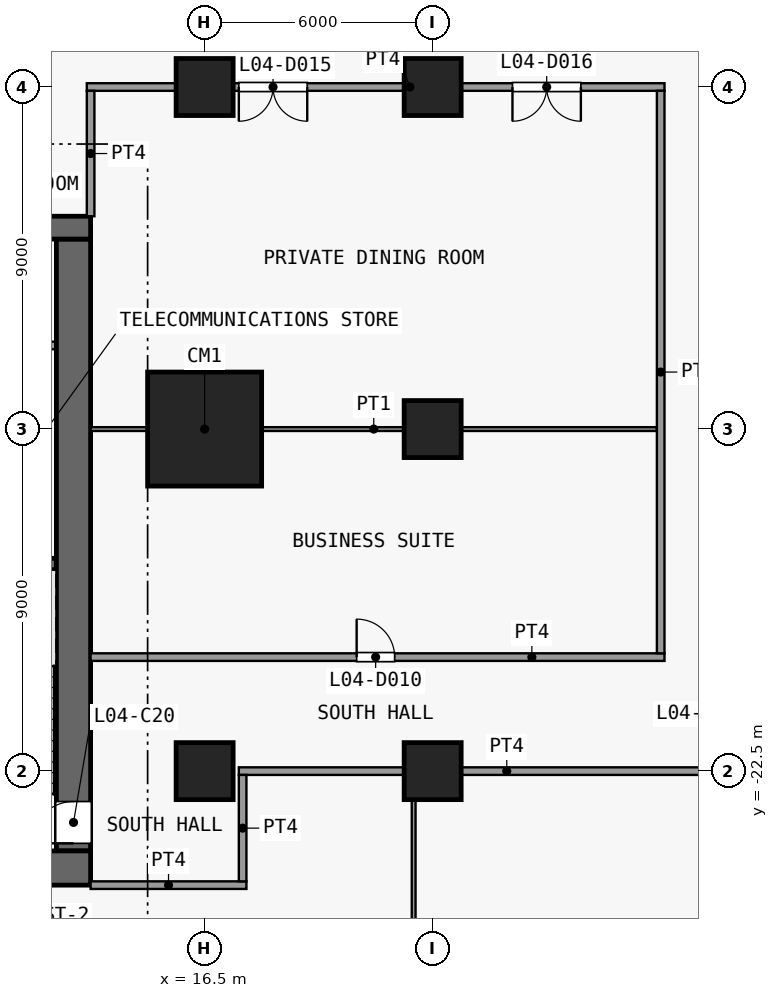
"""IFC4 building model, lengths in metres.
Left out: names, types, materials, properties, quantities, classifications, styles, units other than length and angle.
Written with IfcOpenShell. Run it as: python <this file> out.ifc"""

import sys

from ifc_helpers import new_model, si_unit, direction, frame, frame_2d, origin, origin_2d, place, context, subcontext, project, spatial, rectangle, extrude, element, fill, save


model = new_model("IFC4")
c1 = context("Model", 3, precision=1e-05, world=origin(), true_north=direction((0.0, 1.0)))
c2 = subcontext(c1, "Body", "Model", "MODEL_VIEW")
j1 = project(units=[si_unit("LENGTHUNIT", "METRE"), si_unit("PLANEANGLEUNIT", "RADIAN")], contexts=[c1])
p1 = place(None, origin())
s1 = spatial("IfcSite", under=j1, at=p1, CompositionType="ELEMENT")
p2 = place(p1, origin())
s2 = spatial("IfcBuilding", under=s1, at=p2, CompositionType="ELEMENT")
p3 = place(p2, frame((0.0, 0.0, 23.5)))
s3 = spatial("IfcBuildingStorey", under=s2, at=p3, CompositionType="ELEMENT", Elevation=23.5)
p4 = place(p3, frame((16.5, -22.5, 0.0), z_axis=(0.0, 0.0, 1.0), x_axis=(1.0, 0.0, 0.0)))
e1 = element("IfcColumn", 1, at=p4, inside=s3, PredefinedType="COLUMN", context=c2, shape_type="SweptSolid", body=[
    extrude(rectangle(XDim=1.5, YDim=1.5, at=origin_2d()), origin(), (0.0, 0.0, 1.0), 4.5),
])
p5 = place(p3, frame((16.5, -13.5, 0.0), z_axis=(0.0, 0.0, 1.0), x_axis=(1.0, 0.0, 0.0)))
e2 = element("IfcColumn", 2, at=p5, inside=s3, PredefinedType="COLUMN", context=c2, shape_type="SweptSolid", body=[
    extrude(rectangle(XDim=3.0, YDim=3.0, at=origin_2d()), origin(), (0.0, 0.0, 1.0), 4.5),
])
for number, where, z_axis, x_axis in (
    (3, (16.5, -4.5, 0.0), (0.0, 0.0, 1.0), (1.0, 0.0, 0.0)),
    (4, (22.5, -22.5, 0.0), (0.0, 0.0, 1.0), (1.0, 0.0, 0.0)),
    (5, (22.5, -13.5, 0.0), (0.0, 0.0, 1.0), (1.0, 0.0, 0.0)),
    (6, (22.5, -4.5, 0.0), (0.0, 0.0, 1.0), (1.0, 0.0, 0.0)),
):
    element("IfcColumn", number, at=place(p3, frame(where, z_axis=z_axis, x_axis=x_axis)), inside=s3, PredefinedType="COLUMN", context=c2, shape_type="SweptSolid", body=[
        extrude(rectangle(XDim=1.5, YDim=1.5, at=origin_2d()), origin(), (0.0, 0.0, 1.0), 4.5),
    ])
p6 = place(p3, frame((-13.5, -25.05, 0.0), z_axis=(0.0, 0.0, 1.0), x_axis=(1.0, 0.0, 0.0)))
e7 = element("IfcWall", 7, at=p6, inside=s3, PredefinedType="SHEAR", context=c2, shape_type="SweptSolid", body=[
    extrude(rectangle(XDim=27.0, YDim=0.9, at=frame_2d((13.5, 0.0))), origin(), (0.0, 0.0, 1.0), 4.15),
])
p7 = place(p3, frame((-13.5, -8.2, 0.0), z_axis=(0.0, 0.0, 1.0), x_axis=(1.0, 0.0, 0.0)))
e8 = element("IfcWall", 8, at=p7, inside=s3, PredefinedType="SHEAR", context=c2, shape_type="SweptSolid", body=[
    extrude(rectangle(XDim=27.0, YDim=0.6, at=frame_2d((13.5, 0.0))), origin(), (0.0, 0.0, 1.0), 4.15),
])
p8 = place(p7, frame((7.8, 0.0, 0.0)))
e9 = element("IfcOpeningElement", 9, at=p8, cuts=e8, PredefinedType="OPENING", context=c2, shape_type="SweptSolid", body=[
    extrude(rectangle(XDim=1.8, YDim=2.1, at=frame_2d((0.9, 1.05))), frame((0.0, 0.31, 0.0), z_axis=(0.0, -1.0, 0.0), x_axis=(1.0, 0.0, 0.0)), (0.0, 0.0, 1.0), 0.62),
])
p9 = place(p7, frame((17.4, 0.0, 0.0)))
e10 = element("IfcOpeningElement", 10, at=p9, cuts=e8, PredefinedType="OPENING", context=c2, shape_type="SweptSolid", body=[
    extrude(rectangle(XDim=1.8, YDim=2.1, at=frame_2d((0.9, 1.05))), frame((0.0, 0.31, 0.0), z_axis=(0.0, -1.0, 0.0), x_axis=(1.0, 0.0, 0.0)), (0.0, 0.0, 1.0), 0.62),
])
p10 = place(p7, frame((2.725, 0.0, 0.0)))
e11 = element("IfcOpeningElement", 11, at=p10, cuts=e8, PredefinedType="OPENING", context=c2, shape_type="SweptSolid", body=[
    extrude(rectangle(XDim=0.9, YDim=2.1, at=frame_2d((0.45, 1.05))), frame((0.0, 0.31, 0.0), z_axis=(0.0, -1.0, 0.0), x_axis=(1.0, 0.0, 0.0)), (0.0, 0.0, 1.0), 0.62),
])
p11 = place(p7, frame((23.375, 0.0, 0.0)))
e12 = element("IfcOpeningElement", 12, at=p11, cuts=e8, PredefinedType="OPENING", context=c2, shape_type="SweptSolid", body=[
    extrude(rectangle(XDim=0.9, YDim=2.1, at=frame_2d((0.45, 1.05))), frame((0.0, 0.31, 0.0), z_axis=(0.0, -1.0, 0.0), x_axis=(1.0, 0.0, 0.0)), (0.0, 0.0, 1.0), 0.62),
])
p12 = place(p3, frame((13.05, -24.6, 0.0), z_axis=(0.0, 0.0, 1.0), x_axis=(0.0, 1.0, 0.0)))
e13 = element("IfcWall", 13, at=p12, inside=s3, PredefinedType="SHEAR", context=c2, shape_type="SweptSolid", body=[
    extrude(rectangle(XDim=16.1, YDim=0.9, at=frame_2d((8.05, 0.0))), origin(), (0.0, 0.0, 1.0), 4.15),
])
p13 = place(p12, frame((0.2, 0.0, 0.0)))
e14 = element("IfcOpeningElement", 14, at=p13, cuts=e13, PredefinedType="OPENING", context=c2, shape_type="SweptSolid", body=[
    extrude(rectangle(XDim=1.1, YDim=2.1, at=frame_2d((0.55, 1.05))), frame((0.0, 0.46, 0.0), z_axis=(0.0, -1.0, 0.0), x_axis=(1.0, 0.0, 0.0)), (0.0, 0.0, 1.0), 0.92),
])
p14 = place(p3, frame((9.5, -17.05, 0.0), z_axis=(0.0, 0.0, 1.0), x_axis=(1.0, 0.0, 0.0)))
e15 = element("IfcWall", 15, at=p14, inside=s3, PredefinedType="SHEAR", context=c2, shape_type="SweptSolid", body=[
    extrude(rectangle(XDim=3.1, YDim=0.3, at=frame_2d((1.55, 0.0))), origin(), (0.0, 0.0, 1.0), 4.15),
])
p15 = place(p3, frame((11.15, -11.3, 0.0), z_axis=(0.0, 0.0, 1.0), x_axis=(1.0, 0.0, 0.0)))
e16 = element("IfcWall", 16, at=p15, inside=s3, PredefinedType="PARTITIONING", context=c2, shape_type="SweptSolid", body=[
    extrude(rectangle(XDim=1.45, YDim=0.2, at=frame_2d((0.725, 0.0))), origin(), (0.0, 0.0, 1.0), 4.15),
])
p16 = place(p3, frame((13.5, -25.5, 0.0), z_axis=(0.0, 0.0, 1.0), x_axis=(1.0, 0.0, 0.0)))
e17 = element("IfcWall", 17, at=p16, inside=s3, PredefinedType="PARTITIONING", context=c2, shape_type="SweptSolid", body=[
    extrude(rectangle(XDim=4.1, YDim=0.2, at=frame_2d((2.05, 0.0))), origin(), (0.0, 0.0, 1.0), 4.15),
])
p17 = place(p3, frame((17.4, -22.5, 0.0), z_axis=(0.0, 0.0, 1.0), x_axis=(1.0, 0.0, 0.0)))
e18 = element("IfcWall", 18, at=p17, inside=s3, PredefinedType="PARTITIONING", context=c2, shape_type="SweptSolid", body=[
    extrude(rectangle(XDim=14.1, YDim=0.2, at=frame_2d((7.05, 0.0))), origin(), (0.0, 0.0, 1.0), 4.15),
])
p18 = place(p3, frame((13.5, -19.5, 0.0), z_axis=(0.0, 0.0, 1.0), x_axis=(1.0, 0.0, 0.0)))
e19 = element("IfcWall", 19, at=p18, inside=s3, PredefinedType="PARTITIONING", context=c2, shape_type="SweptSolid", body=[
    extrude(rectangle(XDim=15.1, YDim=0.2, at=frame_2d((7.55, 0.0))), origin(), (0.0, 0.0, 1.0), 4.15),
])
p19 = place(p18, frame((7.0, 0.0, 0.0)))
e20 = element("IfcOpeningElement", 20, at=p19, cuts=e19, PredefinedType="OPENING", context=c2, shape_type="SweptSolid", body=[
    extrude(rectangle(XDim=1.0, YDim=2.1, at=frame_2d((0.5, 1.05))), frame((0.0, 0.11, 0.0), z_axis=(0.0, -1.0, 0.0), x_axis=(1.0, 0.0, 0.0)), (0.0, 0.0, 1.0), 0.22),
])
p20 = place(p3, frame((13.5, -13.5, 0.0), z_axis=(0.0, 0.0, 1.0), x_axis=(1.0, 0.0, 0.0)))
e21 = element("IfcWall", 21, at=p20, inside=s3, PredefinedType="PARTITIONING", context=c2, shape_type="SweptSolid", body=[
    extrude(rectangle(XDim=14.9, YDim=0.1, at=frame_2d((7.45, 0.0))), origin(), (0.0, 0.0, 1.0), 4.15),
])
p21 = place(p3, frame((13.4, -4.5, 0.0), z_axis=(0.0, 0.0, 1.0), x_axis=(1.0, 0.0, 0.0)))
e22 = element("IfcWall", 22, at=p21, inside=s3, PredefinedType="PARTITIONING", context=c2, shape_type="SweptSolid", body=[
    extrude(rectangle(XDim=15.2, YDim=0.2, at=frame_2d((7.6, 0.0))), origin(), (0.0, 0.0, 1.0), 4.15),
])
p22 = place(p21, frame((4.0, 0.0, 0.0)))
e23 = element("IfcOpeningElement", 23, at=p22, cuts=e22, PredefinedType="OPENING", context=c2, shape_type="SweptSolid", body=[
    extrude(rectangle(XDim=1.8, YDim=2.1, at=frame_2d((0.9, 1.05))), frame((0.0, 0.11, 0.0), z_axis=(0.0, -1.0, 0.0), x_axis=(1.0, 0.0, 0.0)), (0.0, 0.0, 1.0), 0.22),
])
p23 = place(p21, frame((11.2, 0.0, 0.0)))
e24 = element("IfcOpeningElement", 24, at=p23, cuts=e22, PredefinedType="OPENING", context=c2, shape_type="SweptSolid", body=[
    extrude(rectangle(XDim=1.8, YDim=2.1, at=frame_2d((0.9, 1.05))), frame((0.0, 0.11, 0.0), z_axis=(0.0, -1.0, 0.0), x_axis=(1.0, 0.0, 0.0)), (0.0, 0.0, 1.0), 0.22),
])
p24 = place(p3, frame((13.5, -7.9, 0.0), z_axis=(0.0, 0.0, 1.0), x_axis=(0.0, 1.0, 0.0)))
e25 = element("IfcWall", 25, at=p24, inside=s3, PredefinedType="PARTITIONING", context=c2, shape_type="SweptSolid", body=[
    extrude(rectangle(XDim=3.3, YDim=0.2, at=frame_2d((1.65, 0.0))), origin(), (0.0, 0.0, 1.0), 4.15),
])
p25 = place(p3, frame((17.5, -25.4, 0.0), z_axis=(0.0, 0.0, 1.0), x_axis=(0.0, 1.0, 0.0)))
e26 = element("IfcWall", 26, at=p25, inside=s3, PredefinedType="PARTITIONING", context=c2, shape_type="SweptSolid", body=[
    extrude(rectangle(XDim=2.8, YDim=0.2, at=frame_2d((1.4, 0.0))), origin(), (0.0, 0.0, 1.0), 4.15),
])
p26 = place(p3, frame((22.0, -31.4, 0.0), z_axis=(0.0, 0.0, 1.0), x_axis=(0.0, 1.0, 0.0)))
e27 = element("IfcWall", 27, at=p26, inside=s3, PredefinedType="PARTITIONING", context=c2, shape_type="SweptSolid", body=[
    extrude(rectangle(XDim=8.8, YDim=0.1, at=frame_2d((4.4, 0.0))), origin(), (0.0, 0.0, 1.0), 4.15),
])
p27 = place(p3, frame((28.5, -19.4, 0.0), z_axis=(0.0, 0.0, 1.0), x_axis=(0.0, 1.0, 0.0)))
e28 = element("IfcWall", 28, at=p27, inside=s3, PredefinedType="PARTITIONING", context=c2, shape_type="SweptSolid", body=[
    extrude(rectangle(XDim=14.8, YDim=0.2, at=frame_2d((7.4, 0.0))), origin(), (0.0, 0.0, 1.0), 4.15),
])
p28 = place(p13, origin())
e29 = element("IfcDoor", 29, at=p28, inside=s3, OperationType="SINGLE_SWING_LEFT", PredefinedType="DOOR", context=c2, shape_type="SweptSolid", body=[
    extrude(rectangle(XDim=1.1, YDim=2.1, at=frame_2d((0.55, 1.05))), frame((0.0, 0.025, 0.0), z_axis=(0.0, -1.0, 0.0), x_axis=(1.0, 0.0, 0.0)), (0.0, 0.0, 1.0), 0.05),
])
fill(e14, e29)
p29 = place(p19, origin())
e30 = element("IfcDoor", 30, at=p29, inside=s3, OperationType="SINGLE_SWING_RIGHT", PredefinedType="DOOR", context=c2, shape_type="SweptSolid", body=[
    extrude(rectangle(XDim=1.0, YDim=2.1, at=frame_2d((0.5, 1.05))), frame((0.0, 0.025, 0.0), z_axis=(0.0, -1.0, 0.0), x_axis=(1.0, 0.0, 0.0)), (0.0, 0.0, 1.0), 0.05),
])
fill(e20, e30)
p30 = place(p22, origin())
e31 = element("IfcDoor", 31, at=p30, inside=s3, OperationType="DOUBLE_DOOR_SINGLE_SWING", PredefinedType="DOOR", context=c2, shape_type="SweptSolid", body=[
    extrude(rectangle(XDim=1.8, YDim=2.1, at=frame_2d((0.9, 1.05))), frame((0.0, 0.025, 0.0), z_axis=(0.0, -1.0, 0.0), x_axis=(1.0, 0.0, 0.0)), (0.0, 0.0, 1.0), 0.05),
])
fill(e23, e31)
p31 = place(p23, origin())
e32 = element("IfcDoor", 32, at=p31, inside=s3, OperationType="DOUBLE_DOOR_SINGLE_SWING", PredefinedType="DOOR", context=c2, shape_type="SweptSolid", body=[
    extrude(rectangle(XDim=1.8, YDim=2.1, at=frame_2d((0.9, 1.05))), frame((0.0, 0.025, 0.0), z_axis=(0.0, -1.0, 0.0), x_axis=(1.0, 0.0, 0.0)), (0.0, 0.0, 1.0), 0.05),
])
fill(e24, e32)
save(model, sys.argv[1])
